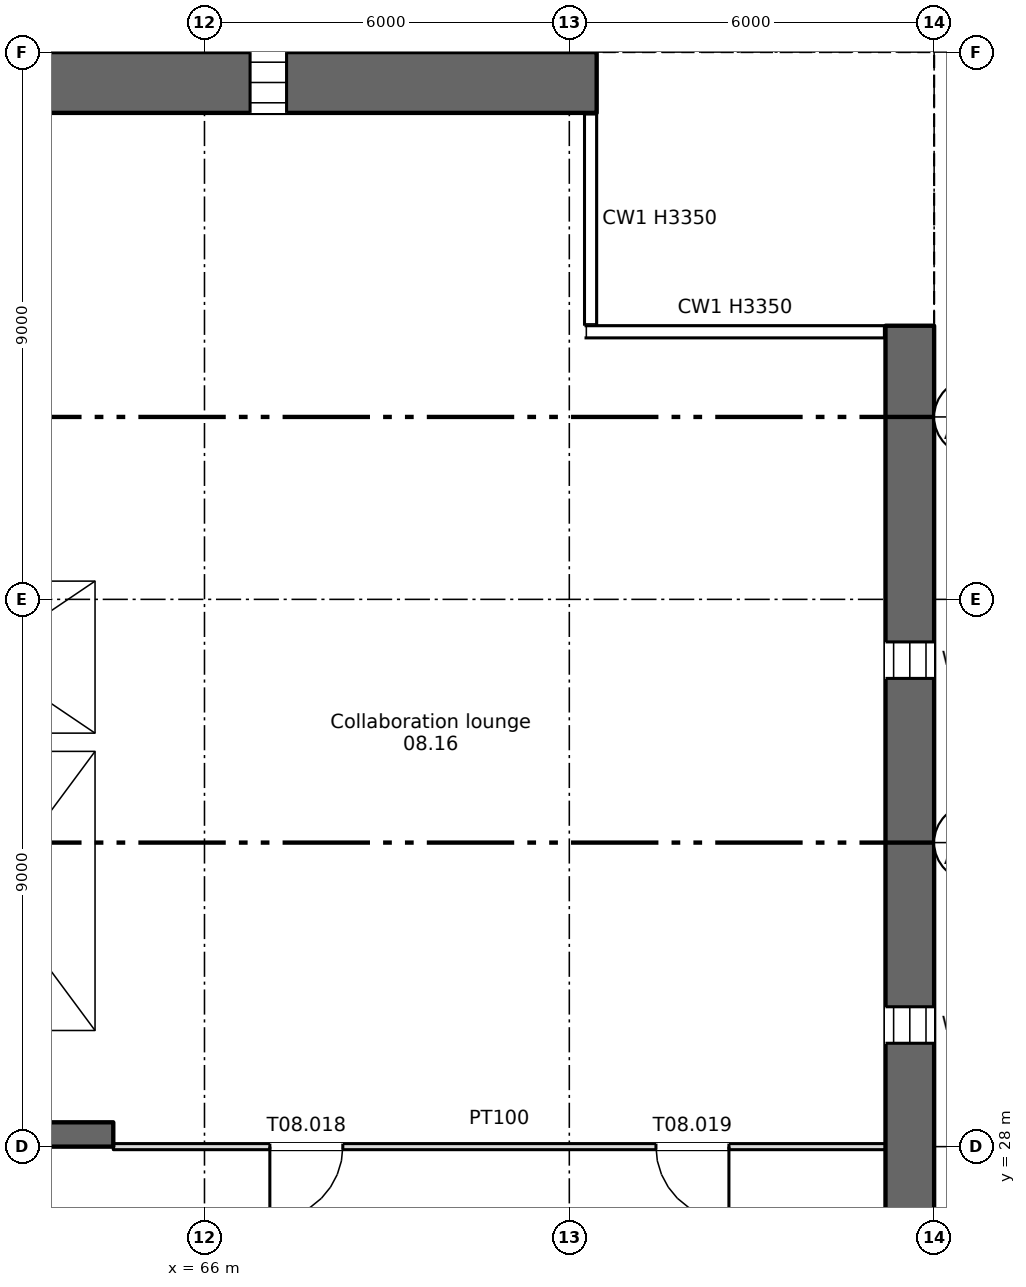
"""IFC4 building model, lengths in metres.
Left out: names, types, materials, properties, quantities, classifications, styles, units other than length and angle.
Written with IfcOpenShell. Run it as: python <this file> out.ifc"""

import sys

from ifc_helpers import new_model, si_unit, direction, frame, frame_2d, origin, place, context, subcontext, project, spatial, rectangle, extrude, element, fill, save


model = new_model("IFC4")
c1 = context("Model", 3, precision=1e-05, world=origin(), true_north=direction((0.0, 1.0)))
c2 = subcontext(c1, "Body", "Model", "MODEL_VIEW")
j1 = project(units=[si_unit("LENGTHUNIT", "METRE"), si_unit("PLANEANGLEUNIT", "RADIAN")], contexts=[c1])
p1 = place(None, origin())
s1 = spatial("IfcSite", under=j1, at=p1, CompositionType="ELEMENT")
p2 = place(p1, origin())
s2 = spatial("IfcBuilding", under=s1, at=p2, CompositionType="ELEMENT")
p3 = place(p2, frame((0.0, 0.0, 30.0)))
s3 = spatial("IfcBuildingStorey", under=s2, at=p3, CompositionType="ELEMENT", Elevation=30.0)
p4 = place(p3, frame((77.6, 4.5, 0.0), z_axis=(0.0, 0.0, 1.0), x_axis=(0.0, 1.0, 0.0)))
e1 = element("IfcWall", 1, at=p4, inside=s3, PredefinedType="SHEAR", context=c2, shape_type="SweptSolid", body=[
    extrude(rectangle(XDim=37.0, YDim=0.8, at=frame_2d((18.5, 0.0))), origin(), (0.0, 0.0, 1.0), 3.35),
])
p5 = place(p4, frame((1.2, 0.0, 0.6)))
e2 = element("IfcOpeningElement", 2, at=p5, cuts=e1, PredefinedType="OPENING", context=c2, shape_type="SweptSolid", body=[
    extrude(rectangle(XDim=0.6, YDim=2.4, at=frame_2d((0.3, 1.2))), frame((0.0, 0.41, 0.0), z_axis=(0.0, -1.0, 0.0), x_axis=(1.0, 0.0, 0.0)), (0.0, 0.0, 1.0), 0.82),
])
p6 = place(p4, frame((7.2, 0.0, 0.6)))
e3 = element("IfcOpeningElement", 3, at=p6, cuts=e1, PredefinedType="OPENING", context=c2, shape_type="SweptSolid", body=[
    extrude(rectangle(XDim=0.6, YDim=2.4, at=frame_2d((0.3, 1.2))), frame((0.0, 0.41, 0.0), z_axis=(0.0, -1.0, 0.0), x_axis=(1.0, 0.0, 0.0)), (0.0, 0.0, 1.0), 0.82),
])
p7 = place(p4, frame((13.2, 0.0, 0.6)))
e4 = element("IfcOpeningElement", 4, at=p7, cuts=e1, PredefinedType="OPENING", context=c2, shape_type="SweptSolid", body=[
    extrude(rectangle(XDim=0.6, YDim=2.4, at=frame_2d((0.3, 1.2))), frame((0.0, 0.41, 0.0), z_axis=(0.0, -1.0, 0.0), x_axis=(1.0, 0.0, 0.0)), (0.0, 0.0, 1.0), 0.82),
])
p8 = place(p4, frame((19.2, 0.0, 0.6)))
e5 = element("IfcOpeningElement", 5, at=p8, cuts=e1, PredefinedType="OPENING", context=c2, shape_type="SweptSolid", body=[
    extrude(rectangle(XDim=0.6, YDim=2.4, at=frame_2d((0.3, 1.2))), frame((0.0, 0.41, 0.0), z_axis=(0.0, -1.0, 0.0), x_axis=(1.0, 0.0, 0.0)), (0.0, 0.0, 1.0), 0.82),
])
p9 = place(p4, frame((25.2, 0.0, 0.6)))
e6 = element("IfcOpeningElement", 6, at=p9, cuts=e1, PredefinedType="OPENING", context=c2, shape_type="SweptSolid", body=[
    extrude(rectangle(XDim=0.6, YDim=2.4, at=frame_2d((0.3, 1.2))), frame((0.0, 0.41, 0.0), z_axis=(0.0, -1.0, 0.0), x_axis=(1.0, 0.0, 0.0)), (0.0, 0.0, 1.0), 0.82),
])
p10 = place(p4, frame((31.2, 0.0, 0.6)))
e7 = element("IfcOpeningElement", 7, at=p10, cuts=e1, PredefinedType="OPENING", context=c2, shape_type="SweptSolid", body=[
    extrude(rectangle(XDim=0.6, YDim=2.4, at=frame_2d((0.3, 1.2))), frame((0.0, 0.41, 0.0), z_axis=(0.0, -1.0, 0.0), x_axis=(1.0, 0.0, 0.0)), (0.0, 0.0, 1.0), 0.82),
])
p11 = place(p3, frame((5.55, 45.5, 0.0), z_axis=(0.0, 0.0, 1.0), x_axis=(1.0, 0.0, 0.0)))
e8 = element("IfcWall", 8, at=p11, inside=s3, PredefinedType="SHEAR", context=c2, shape_type="SweptSolid", body=[
    extrude(rectangle(XDim=66.9, YDim=1.0, at=frame_2d((33.45, 0.0))), origin(), (0.0, 0.0, 1.0), 3.35),
])
p12 = place(p11, frame((7.2, 0.0, 0.6)))
e9 = element("IfcOpeningElement", 9, at=p12, cuts=e8, PredefinedType="OPENING", context=c2, shape_type="SweptSolid", body=[
    extrude(rectangle(XDim=0.6, YDim=2.4, at=frame_2d((0.3, 1.2))), frame((0.0, 0.51, 0.0), z_axis=(0.0, -1.0, 0.0), x_axis=(1.0, 0.0, 0.0)), (0.0, 0.0, 1.0), 1.02),
])
p13 = place(p11, frame((61.2, 0.0, 0.6)))
e10 = element("IfcOpeningElement", 10, at=p13, cuts=e8, PredefinedType="OPENING", context=c2, shape_type="SweptSolid", body=[
    extrude(rectangle(XDim=0.6, YDim=2.4, at=frame_2d((0.3, 1.2))), frame((0.0, 0.51, 0.0), z_axis=(0.0, -1.0, 0.0), x_axis=(1.0, 0.0, 0.0)), (0.0, 0.0, 1.0), 1.02),
])
p14 = place(p3, frame((6.7, 28.2, 0.0), z_axis=(0.0, 0.0, 1.0), x_axis=(1.0, 0.0, 0.0)))
e11 = element("IfcWall", 11, at=p14, inside=s3, PredefinedType="SHEAR", context=c2, shape_type="SweptSolid", body=[
    extrude(rectangle(XDim=57.8, YDim=0.4, at=frame_2d((28.9, 0.0))), origin(), (0.0, 0.0, 1.0), 3.35),
])
p15 = place(p14, frame((12.062, 0.0, 0.0)))
e12 = element("IfcOpeningElement", 12, at=p15, cuts=e11, PredefinedType="OPENING", context=c2, shape_type="SweptSolid", body=[
    extrude(rectangle(XDim=0.9, YDim=2.1, at=frame_2d((0.45, 1.05))), frame((0.0, 0.21, 0.0), z_axis=(0.0, -1.0, 0.0), x_axis=(1.0, 0.0, 0.0)), (0.0, 0.0, 1.0), 0.42),
])
p16 = place(p14, frame((14.637, 0.0, 0.0)))
e13 = element("IfcOpeningElement", 13, at=p16, cuts=e11, PredefinedType="OPENING", context=c2, shape_type="SweptSolid", body=[
    extrude(rectangle(XDim=0.9, YDim=2.1, at=frame_2d((0.45, 1.05))), frame((0.0, 0.21, 0.0), z_axis=(0.0, -1.0, 0.0), x_axis=(1.0, 0.0, 0.0)), (0.0, 0.0, 1.0), 0.42),
])
p17 = place(p14, frame((49.062, 0.0, 0.0)))
e14 = element("IfcOpeningElement", 14, at=p17, cuts=e11, PredefinedType="OPENING", context=c2, shape_type="SweptSolid", body=[
    extrude(rectangle(XDim=0.9, YDim=2.1, at=frame_2d((0.45, 1.05))), frame((0.0, 0.21, 0.0), z_axis=(0.0, -1.0, 0.0), x_axis=(1.0, 0.0, 0.0)), (0.0, 0.0, 1.0), 0.42),
])
p18 = place(p14, frame((51.637, 0.0, 0.0)))
e15 = element("IfcOpeningElement", 15, at=p18, cuts=e11, PredefinedType="OPENING", context=c2, shape_type="SweptSolid", body=[
    extrude(rectangle(XDim=0.9, YDim=2.1, at=frame_2d((0.45, 1.05))), frame((0.0, 0.21, 0.0), z_axis=(0.0, -1.0, 0.0), x_axis=(1.0, 0.0, 0.0)), (0.0, 0.0, 1.0), 0.42),
])
p19 = place(p14, frame((1.35, 0.0, 0.0)))
e16 = element("IfcOpeningElement", 16, at=p19, cuts=e11, PredefinedType="OPENING", context=c2, shape_type="SweptSolid", body=[
    extrude(rectangle(XDim=0.9, YDim=2.1, at=frame_2d((0.45, 1.05))), frame((0.0, 0.21, 0.0), z_axis=(0.0, -1.0, 0.0), x_axis=(1.0, 0.0, 0.0)), (0.0, 0.0, 1.0), 0.42),
])
p20 = place(p14, frame((4.7, 0.0, 0.0)))
e17 = element("IfcOpeningElement", 17, at=p20, cuts=e11, PredefinedType="OPENING", context=c2, shape_type="SweptSolid", body=[
    extrude(rectangle(XDim=1.2, YDim=2.1, at=frame_2d((0.6, 1.05))), frame((0.0, 0.21, 0.0), z_axis=(0.0, -1.0, 0.0), x_axis=(1.0, 0.0, 0.0)), (0.0, 0.0, 1.0), 0.42),
])
p21 = place(p14, frame((31.7, 0.0, 0.0)))
e18 = element("IfcOpeningElement", 18, at=p21, cuts=e11, PredefinedType="OPENING", context=c2, shape_type="SweptSolid", body=[
    extrude(rectangle(XDim=1.2, YDim=2.1, at=frame_2d((0.6, 1.05))), frame((0.0, 0.21, 0.0), z_axis=(0.0, -1.0, 0.0), x_axis=(1.0, 0.0, 0.0)), (0.0, 0.0, 1.0), 0.42),
])
p22 = place(p14, frame((55.2, 0.0, 0.0)))
e19 = element("IfcOpeningElement", 19, at=p22, cuts=e11, PredefinedType="OPENING", context=c2, shape_type="SweptSolid", body=[
    extrude(rectangle(XDim=1.2, YDim=2.1, at=frame_2d((0.6, 1.05))), frame((0.0, 0.21, 0.0), z_axis=(0.0, -1.0, 0.0), x_axis=(1.0, 0.0, 0.0)), (0.0, 0.0, 1.0), 0.42),
])
p23 = place(p14, frame((21.7, 0.0, 0.0)))
e20 = element("IfcOpeningElement", 20, at=p23, cuts=e11, PredefinedType="OPENING", context=c2, shape_type="SweptSolid", body=[
    extrude(rectangle(XDim=1.2, YDim=2.1, at=frame_2d((0.6, 1.05))), frame((0.0, 0.21, 0.0), z_axis=(0.0, -1.0, 0.0), x_axis=(1.0, 0.0, 0.0)), (0.0, 0.0, 1.0), 0.42),
])
p24 = place(p14, frame((41.7, 0.0, 0.0)))
e21 = element("IfcOpeningElement", 21, at=p24, cuts=e11, PredefinedType="OPENING", context=c2, shape_type="SweptSolid", body=[
    extrude(rectangle(XDim=1.2, YDim=2.1, at=frame_2d((0.6, 1.05))), frame((0.0, 0.21, 0.0), z_axis=(0.0, -1.0, 0.0), x_axis=(1.0, 0.0, 0.0)), (0.0, 0.0, 1.0), 0.42),
])
p25 = place(p14, frame((24.85, 0.0, 0.0)))
e22 = element("IfcOpeningElement", 22, at=p25, cuts=e11, PredefinedType="OPENING", context=c2, shape_type="SweptSolid", body=[
    extrude(rectangle(XDim=2.4, YDim=2.1, at=frame_2d((1.2, 1.05))), frame((0.0, 0.21, 0.0), z_axis=(0.0, -1.0, 0.0), x_axis=(1.0, 0.0, 0.0)), (0.0, 0.0, 1.0), 0.42),
])
p26 = place(p14, frame((37.35, 0.0, 0.0)))
e23 = element("IfcOpeningElement", 23, at=p26, cuts=e11, PredefinedType="OPENING", context=c2, shape_type="SweptSolid", body=[
    extrude(rectangle(XDim=2.4, YDim=2.1, at=frame_2d((1.2, 1.05))), frame((0.0, 0.21, 0.0), z_axis=(0.0, -1.0, 0.0), x_axis=(1.0, 0.0, 0.0)), (0.0, 0.0, 1.0), 0.42),
])
p27 = place(p14, frame((7.85, 0.0, 0.0)))
e24 = element("IfcOpeningElement", 24, at=p27, cuts=e11, PredefinedType="OPENING", context=c2, shape_type="SweptSolid", body=[
    extrude(rectangle(XDim=2.4, YDim=2.1, at=frame_2d((1.2, 1.05))), frame((0.0, 0.21, 0.0), z_axis=(0.0, -1.0, 0.0), x_axis=(1.0, 0.0, 0.0)), (0.0, 0.0, 1.0), 0.42),
])
p28 = place(p14, frame((28.85, 0.0, 0.0)))
e25 = element("IfcOpeningElement", 25, at=p28, cuts=e11, PredefinedType="OPENING", context=c2, shape_type="SweptSolid", body=[
    extrude(rectangle(XDim=0.9, YDim=2.1, at=frame_2d((0.45, 1.05))), frame((0.0, 0.21, 0.0), z_axis=(0.0, -1.0, 0.0), x_axis=(1.0, 0.0, 0.0)), (0.0, 0.0, 1.0), 0.42),
])
p29 = place(p14, frame((34.85, 0.0, 0.0)))
e26 = element("IfcOpeningElement", 26, at=p29, cuts=e11, PredefinedType="OPENING", context=c2, shape_type="SweptSolid", body=[
    extrude(rectangle(XDim=0.9, YDim=2.1, at=frame_2d((0.45, 1.05))), frame((0.0, 0.21, 0.0), z_axis=(0.0, -1.0, 0.0), x_axis=(1.0, 0.0, 0.0)), (0.0, 0.0, 1.0), 0.42),
])
p30 = place(p3, frame((64.35, 34.8, 0.0), z_axis=(0.0, 0.0, 1.0), x_axis=(0.0, 1.0, 0.0)))
e27 = element("IfcWall", 27, at=p30, inside=s3, PredefinedType="SHEAR", context=c2, shape_type="SweptSolid", body=[
    extrude(rectangle(XDim=10.2, YDim=0.3, at=frame_2d((5.1, 0.0))), origin(), (0.0, 0.0, 1.0), 3.35),
])
p31 = place(p3, frame((64.35, 28.4, 0.0), z_axis=(0.0, 0.0, 1.0), x_axis=(0.0, 1.0, 0.0)))
e28 = element("IfcWall", 28, at=p31, inside=s3, PredefinedType="SHEAR", context=c2, shape_type="SweptSolid", body=[
    extrude(rectangle(XDim=6.1, YDim=0.3, at=frame_2d((3.05, 0.0))), origin(), (0.0, 0.0, 1.0), 3.35),
])
p32 = place(p3, frame((60.5, 34.65, 0.0), z_axis=(0.0, 0.0, 1.0), x_axis=(1.0, 0.0, 0.0)))
e29 = element("IfcWall", 29, at=p32, inside=s3, PredefinedType="SHEAR", context=c2, shape_type="SweptSolid", body=[
    extrude(rectangle(XDim=4.0, YDim=0.3, at=frame_2d((2.0, 0.0))), origin(), (0.0, 0.0, 1.0), 3.35),
])
p33 = place(p3, frame((60.5, 37.45, 0.0), z_axis=(0.0, 0.0, 1.0), x_axis=(1.0, 0.0, 0.0)))
e30 = element("IfcWall", 30, at=p33, inside=s3, PredefinedType="SHEAR", context=c2, shape_type="SweptSolid", body=[
    extrude(rectangle(XDim=3.7, YDim=0.3, at=frame_2d((1.85, 0.0))), origin(), (0.0, 0.0, 1.0), 3.35),
])
p34 = place(p33, frame((1.3, 0.0, 0.0)))
e31 = element("IfcOpeningElement", 31, at=p34, cuts=e30, PredefinedType="OPENING", context=c2, shape_type="SweptSolid", body=[
    extrude(rectangle(XDim=1.1, YDim=2.1, at=frame_2d((0.55, 1.05))), frame((0.0, 0.16, 0.0), z_axis=(0.0, -1.0, 0.0), x_axis=(1.0, 0.0, 0.0)), (0.0, 0.0, 1.0), 0.32),
])
p35 = place(p3, frame((64.5, 28.0, 0.0), z_axis=(0.0, 0.0, 1.0), x_axis=(1.0, 0.0, 0.0)))
e32 = element("IfcWall", 32, at=p35, inside=s3, PredefinedType="PARTITIONING", context=c2, shape_type="SweptSolid", body=[
    extrude(rectangle(XDim=12.7, YDim=0.1, at=frame_2d((6.35, 0.0))), origin(), (0.0, 0.0, 1.0), 3.35),
])
p36 = place(p35, frame((2.575, 0.0, 0.0)))
e33 = element("IfcOpeningElement", 33, at=p36, cuts=e32, PredefinedType="OPENING", context=c2, shape_type="SweptSolid", body=[
    extrude(rectangle(XDim=1.2, YDim=2.1, at=frame_2d((0.6, 1.05))), frame((0.0, 0.06, 0.0), z_axis=(0.0, -1.0, 0.0), x_axis=(1.0, 0.0, 0.0)), (0.0, 0.0, 1.0), 0.12),
])
p37 = place(p35, frame((8.925, 0.0, 0.0)))
e34 = element("IfcOpeningElement", 34, at=p37, cuts=e32, PredefinedType="OPENING", context=c2, shape_type="SweptSolid", body=[
    extrude(rectangle(XDim=1.2, YDim=2.1, at=frame_2d((0.6, 1.05))), frame((0.0, 0.06, 0.0), z_axis=(0.0, -1.0, 0.0), x_axis=(1.0, 0.0, 0.0)), (0.0, 0.0, 1.0), 0.12),
])
p38 = place(p13, origin())
e35 = element("IfcWindow", 35, at=p38, inside=s3, PartitioningType="SINGLE_PANEL", PredefinedType="WINDOW", context=c2, shape_type="SweptSolid", body=[
    extrude(rectangle(XDim=0.6, YDim=2.4, at=frame_2d((0.3, 1.2))), frame((0.0, 0.03, 0.0), z_axis=(0.0, -1.0, 0.0), x_axis=(1.0, 0.0, 0.0)), (0.0, 0.0, 1.0), 0.06),
])
fill(e10, e35)
p39 = place(p9, origin())
e36 = element("IfcWindow", 36, at=p39, inside=s3, PartitioningType="SINGLE_PANEL", PredefinedType="WINDOW", context=c2, shape_type="SweptSolid", body=[
    extrude(rectangle(XDim=0.6, YDim=2.4, at=frame_2d((0.3, 1.2))), frame((0.0, 0.03, 0.0), z_axis=(0.0, -1.0, 0.0), x_axis=(1.0, 0.0, 0.0)), (0.0, 0.0, 1.0), 0.06),
])
fill(e6, e36)
p40 = place(p10, origin())
e37 = element("IfcWindow", 37, at=p40, inside=s3, PartitioningType="SINGLE_PANEL", PredefinedType="WINDOW", context=c2, shape_type="SweptSolid", body=[
    extrude(rectangle(XDim=0.6, YDim=2.4, at=frame_2d((0.3, 1.2))), frame((0.0, 0.03, 0.0), z_axis=(0.0, -1.0, 0.0), x_axis=(1.0, 0.0, 0.0)), (0.0, 0.0, 1.0), 0.06),
])
fill(e7, e37)
p41 = place(p36, origin())
e38 = element("IfcDoor", 38, at=p41, inside=s3, OperationType="SINGLE_SWING_LEFT", PredefinedType="DOOR", context=c2, shape_type="SweptSolid", body=[
    extrude(rectangle(XDim=1.2, YDim=2.1, at=frame_2d((0.6, 1.05))), frame((0.0, 0.025, 0.0), z_axis=(0.0, -1.0, 0.0), x_axis=(1.0, 0.0, 0.0)), (0.0, 0.0, 1.0), 0.05),
])
fill(e33, e38)
p42 = place(p37, origin())
e39 = element("IfcDoor", 39, at=p42, inside=s3, OperationType="SINGLE_SWING_RIGHT", PredefinedType="DOOR", context=c2, shape_type="SweptSolid", body=[
    extrude(rectangle(XDim=1.2, YDim=2.1, at=frame_2d((0.6, 1.05))), frame((0.0, 0.025, 0.0), z_axis=(0.0, -1.0, 0.0), x_axis=(1.0, 0.0, 0.0)), (0.0, 0.0, 1.0), 0.05),
])
fill(e34, e39)
save(model, sys.argv[1])
